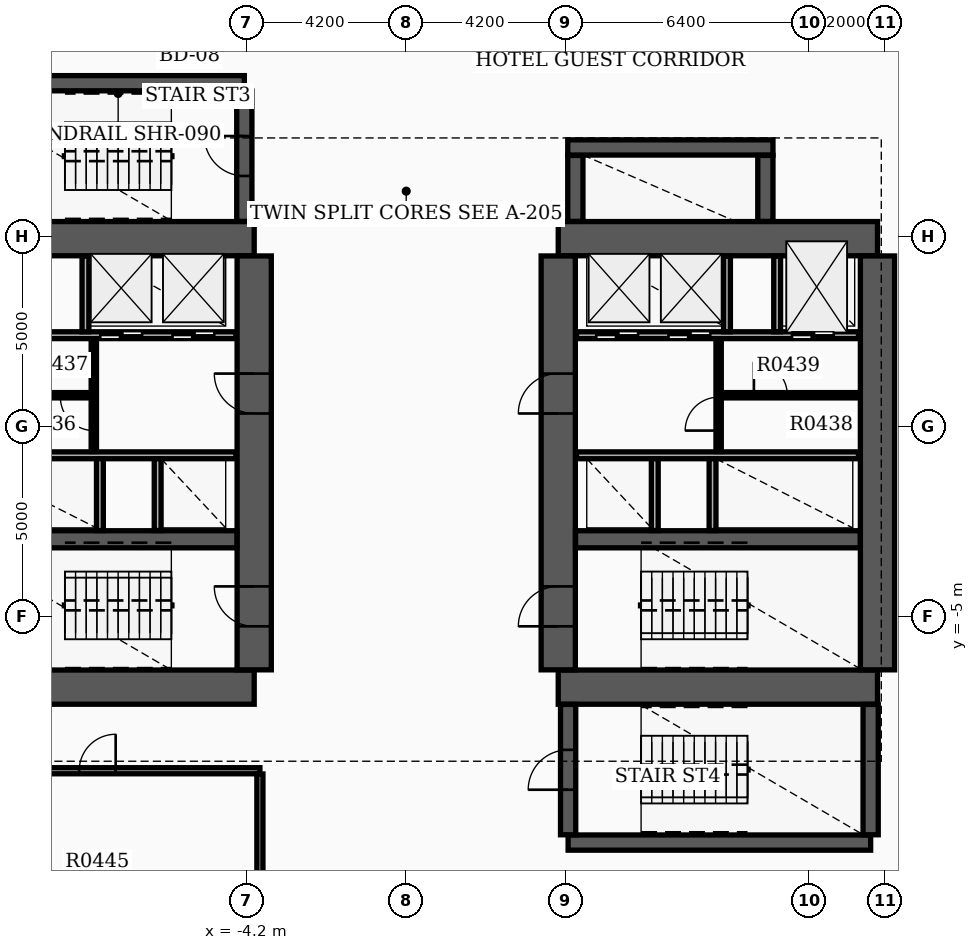
"""IFC4 building model, lengths in metres.
Left out: names, types, materials, properties, quantities, classifications, styles, units other than length and angle.
Written with IfcOpenShell. Run it as: python <this file> out.ifc"""

import sys

from ifc_helpers import new_model, si_unit, direction, frame, frame_2d, origin, place, context, subcontext, project, spatial, rectangle, extrude, element, fill, save


model = new_model("IFC4")
c1 = context("Model", 3, precision=1e-05, world=origin(), true_north=direction((0.0, 1.0)))
c2 = subcontext(c1, "Body", "Model", "MODEL_VIEW")
j1 = project(units=[si_unit("LENGTHUNIT", "METRE"), si_unit("PLANEANGLEUNIT", "RADIAN")], contexts=[c1])
p1 = place(None, origin())
s1 = spatial("IfcSite", under=j1, at=p1, CompositionType="ELEMENT")
p2 = place(p1, origin())
s2 = spatial("IfcBuilding", under=s1, at=p2, CompositionType="ELEMENT")
p3 = place(p2, frame((0.0, 0.0, 31.5)))
s3 = spatial("IfcBuildingStorey", under=s2, at=p3, CompositionType="ELEMENT", Elevation=31.5)
for number, where, z_axis, x_axis in (
    (1, (-12.4, -6.85, 0.0), (0.0, 0.0, 1.0), (1.0, 0.0, 0.0)),
    (2, (-12.4, 4.95, 0.0), (0.0, 0.0, 1.0), (1.0, 0.0, 0.0)),
):
    element("IfcWall", number, at=place(p3, frame(where, z_axis=z_axis, x_axis=x_axis)), inside=s3, PredefinedType="SHEAR", context=c2, shape_type="SweptSolid", body=[
        extrude(rectangle(XDim=8.4, YDim=0.9, at=frame_2d((4.2, 0.0))), origin(), (0.0, 0.0, 1.0), 3.7),
    ])
p4 = place(p3, frame((-4.0, -6.395, 0.0), z_axis=(0.0, 0.0, 1.0), x_axis=(0.0, 1.0, 0.0)))
e3 = element("IfcWall", 3, at=p4, inside=s3, PredefinedType="SHEAR", context=c2, shape_type="SweptSolid", body=[
    extrude(rectangle(XDim=10.89, YDim=0.9, at=frame_2d((5.445, 0.0))), origin(), (0.0, 0.0, 1.0), 3.7),
])
p5 = place(p4, frame((1.145, 0.0, 0.0)))
e4 = element("IfcOpeningElement", 4, at=p5, cuts=e3, PredefinedType="OPENING", context=c2, shape_type="SweptSolid", body=[
    extrude(rectangle(XDim=1.05, YDim=2.15, at=frame_2d((0.525, 1.075))), frame((0.0, 0.46, 0.0), z_axis=(0.0, -1.0, 0.0), x_axis=(1.0, 0.0, 0.0)), (0.0, 0.0, 1.0), 0.92),
])
p6 = place(p4, frame((6.745, 0.0, 0.0)))
e5 = element("IfcOpeningElement", 5, at=p6, cuts=e3, PredefinedType="OPENING", context=c2, shape_type="SweptSolid", body=[
    extrude(rectangle(XDim=1.05, YDim=2.15, at=frame_2d((0.525, 1.075))), frame((0.0, 0.46, 0.0), z_axis=(0.0, -1.0, 0.0), x_axis=(1.0, 0.0, 0.0)), (0.0, 0.0, 1.0), 0.92),
])
p7 = place(p3, frame((-11.945, -2.96, 0.0), z_axis=(0.0, 0.0, 1.0), x_axis=(1.0, 0.0, 0.0)))
e6 = element("IfcWall", 6, at=p7, inside=s3, PredefinedType="SHEAR", context=c2, shape_type="SweptSolid", body=[
    extrude(rectangle(XDim=7.49, YDim=0.45, at=frame_2d((3.745, 0.0))), origin(), (0.0, 0.0, 1.0), 3.7),
])
for number, where, z_axis, x_axis in (
    (7, (4.0, -6.85, 0.0), (0.0, 0.0, 1.0), (1.0, 0.0, 0.0)),
    (8, (4.0, 4.95, 0.0), (0.0, 0.0, 1.0), (1.0, 0.0, 0.0)),
):
    element("IfcWall", number, at=place(p3, frame(where, z_axis=z_axis, x_axis=x_axis)), inside=s3, PredefinedType="SHEAR", context=c2, shape_type="SweptSolid", body=[
        extrude(rectangle(XDim=8.4, YDim=0.9, at=frame_2d((4.2, 0.0))), origin(), (0.0, 0.0, 1.0), 3.7),
    ])
p8 = place(p3, frame((4.0, -6.395, 0.0), z_axis=(0.0, 0.0, 1.0), x_axis=(0.0, 1.0, 0.0)))
e9 = element("IfcWall", 9, at=p8, inside=s3, PredefinedType="SHEAR", context=c2, shape_type="SweptSolid", body=[
    extrude(rectangle(XDim=10.89, YDim=0.9, at=frame_2d((5.445, 0.0))), origin(), (0.0, 0.0, 1.0), 3.7),
])
p9 = place(p8, frame((1.145, 0.0, 0.0)))
e10 = element("IfcOpeningElement", 10, at=p9, cuts=e9, PredefinedType="OPENING", context=c2, shape_type="SweptSolid", body=[
    extrude(rectangle(XDim=1.05, YDim=2.15, at=frame_2d((0.525, 1.075))), frame((0.0, 0.46, 0.0), z_axis=(0.0, -1.0, 0.0), x_axis=(1.0, 0.0, 0.0)), (0.0, 0.0, 1.0), 0.92),
])
p10 = place(p8, frame((6.745, 0.0, 0.0)))
e11 = element("IfcOpeningElement", 11, at=p10, cuts=e9, PredefinedType="OPENING", context=c2, shape_type="SweptSolid", body=[
    extrude(rectangle(XDim=1.05, YDim=2.15, at=frame_2d((0.525, 1.075))), frame((0.0, 0.46, 0.0), z_axis=(0.0, -1.0, 0.0), x_axis=(1.0, 0.0, 0.0)), (0.0, 0.0, 1.0), 0.92),
])
p11 = place(p3, frame((12.4, -6.395, 0.0), z_axis=(0.0, 0.0, 1.0), x_axis=(0.0, 1.0, 0.0)))
e12 = element("IfcWall", 12, at=p11, inside=s3, PredefinedType="SHEAR", context=c2, shape_type="SweptSolid", body=[
    extrude(rectangle(XDim=10.89, YDim=0.9, at=frame_2d((5.445, 0.0))), origin(), (0.0, 0.0, 1.0), 3.7),
])
p12 = place(p3, frame((4.455, -2.96, 0.0), z_axis=(0.0, 0.0, 1.0), x_axis=(1.0, 0.0, 0.0)))
e13 = element("IfcWall", 13, at=p12, inside=s3, PredefinedType="SHEAR", context=c2, shape_type="SweptSolid", body=[
    extrude(rectangle(XDim=7.49, YDim=0.45, at=frame_2d((3.745, 0.0))), origin(), (0.0, 0.0, 1.0), 3.7),
])
p13 = place(p3, frame((-12.22, 9.04, 0.0), z_axis=(0.0, 0.0, 1.0), x_axis=(1.0, 0.0, 0.0)))
e14 = element("IfcWall", 14, at=p13, inside=s3, PredefinedType="SHEAR", context=c2, shape_type="SweptSolid", body=[
    extrude(rectangle(XDim=7.96, YDim=0.4, at=frame_2d((3.98, 0.0))), origin(), (0.0, 0.0, 1.0), 3.7),
])
p14 = place(p3, frame((-4.26, 5.405, 0.0), z_axis=(0.0, 0.0, 1.0), x_axis=(0.0, 1.0, 0.0)))
e15 = element("IfcWall", 15, at=p14, inside=s3, PredefinedType="SHEAR", context=c2, shape_type="SweptSolid", body=[
    extrude(rectangle(XDim=3.43, YDim=0.4, at=frame_2d((1.715, 0.0))), origin(), (0.0, 0.0, 1.0), 3.7),
])
p15 = place(p14, frame((1.195, 0.0, 0.0)))
e16 = element("IfcOpeningElement", 16, at=p15, cuts=e15, PredefinedType="OPENING", context=c2, shape_type="SweptSolid", body=[
    extrude(rectangle(XDim=1.05, YDim=2.15, at=frame_2d((0.525, 1.075))), frame((0.0, 0.21, 0.0), z_axis=(0.0, -1.0, 0.0), x_axis=(1.0, 0.0, 0.0)), (0.0, 0.0, 1.0), 0.42),
])
p16 = place(p3, frame((4.26, -10.94, 0.0), z_axis=(0.0, 0.0, 1.0), x_axis=(1.0, 0.0, 0.0)))
e17 = element("IfcWall", 17, at=p16, inside=s3, PredefinedType="SHEAR", context=c2, shape_type="SweptSolid", body=[
    extrude(rectangle(XDim=7.96, YDim=0.4, at=frame_2d((3.98, 0.0))), origin(), (0.0, 0.0, 1.0), 3.7),
])
p17 = place(p3, frame((4.26, -10.735, 0.0), z_axis=(0.0, 0.0, 1.0), x_axis=(0.0, 1.0, 0.0)))
e18 = element("IfcWall", 18, at=p17, inside=s3, PredefinedType="SHEAR", context=c2, shape_type="SweptSolid", body=[
    extrude(rectangle(XDim=3.43, YDim=0.4, at=frame_2d((1.715, 0.0))), origin(), (0.0, 0.0, 1.0), 3.7),
])
p18 = place(p17, frame((1.185, 0.0, 0.0)))
e19 = element("IfcOpeningElement", 19, at=p18, cuts=e18, PredefinedType="OPENING", context=c2, shape_type="SweptSolid", body=[
    extrude(rectangle(XDim=1.05, YDim=2.15, at=frame_2d((0.525, 1.075))), frame((0.0, 0.21, 0.0), z_axis=(0.0, -1.0, 0.0), x_axis=(1.0, 0.0, 0.0)), (0.0, 0.0, 1.0), 0.42),
])
p19 = place(p3, frame((12.22, -10.735, 0.0), z_axis=(0.0, 0.0, 1.0), x_axis=(0.0, 1.0, 0.0)))
e20 = element("IfcWall", 20, at=p19, inside=s3, PredefinedType="SHEAR", context=c2, shape_type="SweptSolid", body=[
    extrude(rectangle(XDim=3.43, YDim=0.4, at=frame_2d((1.715, 0.0))), origin(), (0.0, 0.0, 1.0), 3.7),
])
p20 = place(p3, frame((4.45, 5.405, 0.0), z_axis=(0.0, 0.0, 1.0), x_axis=(0.0, 1.0, 0.0)))
e21 = element("IfcWall", 21, at=p20, inside=s3, PredefinedType="SHEAR", context=c2, shape_type="SweptSolid", body=[
    extrude(rectangle(XDim=1.735, YDim=0.4, at=frame_2d((0.867, 0.0))), origin(), (0.0, 0.0, 1.0), 3.7),
])
p21 = place(p3, frame((4.25, 7.35, 0.0), z_axis=(0.0, 0.0, 1.0), x_axis=(1.0, 0.0, 0.0)))
e22 = element("IfcWall", 22, at=p21, inside=s3, PredefinedType="SHEAR", context=c2, shape_type="SweptSolid", body=[
    extrude(rectangle(XDim=5.4, YDim=0.4, at=frame_2d((2.7, 0.0))), origin(), (0.0, 0.0, 1.0), 3.7),
])
p22 = place(p3, frame((9.45, 5.405, 0.0), z_axis=(0.0, 0.0, 1.0), x_axis=(0.0, 1.0, 0.0)))
e23 = element("IfcWall", 23, at=p22, inside=s3, PredefinedType="SHEAR", context=c2, shape_type="SweptSolid", body=[
    extrude(rectangle(XDim=1.735, YDim=0.4, at=frame_2d((0.867, 0.0))), origin(), (0.0, 0.0, 1.0), 3.7),
])
p23 = place(p3, frame((-11.9, 2.41, 0.0), z_axis=(0.0, 0.0, 1.0), x_axis=(1.0, 0.0, 0.0)))
e24 = element("IfcWall", 24, at=p23, inside=s3, PredefinedType="SOLIDWALL", context=c2, shape_type="SweptSolid", body=[
    extrude(rectangle(XDim=7.42, YDim=0.18, at=frame_2d((3.71, 0.0))), origin(), (0.0, 0.0, 1.0), 2.9),
])
p24 = place(p23, frame((0.55, 0.0, 0.0)))
e25 = element("IfcOpeningElement", 25, at=p24, cuts=e24, PredefinedType="OPENING", context=c2, shape_type="SweptSolid", body=[
    extrude(rectangle(XDim=1.1, YDim=2.15, at=frame_2d((0.55, 1.075))), frame((0.0, 0.1, 0.0), z_axis=(0.0, -1.0, 0.0), x_axis=(1.0, 0.0, 0.0)), (0.0, 0.0, 1.0), 0.2),
])
p25 = place(p23, frame((3.85, 0.0, 0.0)))
e26 = element("IfcOpeningElement", 26, at=p25, cuts=e24, PredefinedType="OPENING", context=c2, shape_type="SweptSolid", body=[
    extrude(rectangle(XDim=1.1, YDim=2.15, at=frame_2d((0.55, 1.075))), frame((0.0, 0.1, 0.0), z_axis=(0.0, -1.0, 0.0), x_axis=(1.0, 0.0, 0.0)), (0.0, 0.0, 1.0), 0.2),
])
p26 = place(p23, frame((5.75, 0.0, 0.0)))
e27 = element("IfcOpeningElement", 27, at=p26, cuts=e24, PredefinedType="OPENING", context=c2, shape_type="SweptSolid", body=[
    extrude(rectangle(XDim=1.1, YDim=2.15, at=frame_2d((0.55, 1.075))), frame((0.0, 0.1, 0.0), z_axis=(0.0, -1.0, 0.0), x_axis=(1.0, 0.0, 0.0)), (0.0, 0.0, 1.0), 0.2),
])
p27 = place(p3, frame((4.48, 2.41, 0.0), z_axis=(0.0, 0.0, 1.0), x_axis=(1.0, 0.0, 0.0)))
e28 = element("IfcWall", 28, at=p27, inside=s3, PredefinedType="SOLIDWALL", context=c2, shape_type="SweptSolid", body=[
    extrude(rectangle(XDim=7.42, YDim=0.18, at=frame_2d((3.71, 0.0))), origin(), (0.0, 0.0, 1.0), 2.9),
])
p28 = place(p27, frame((5.67, 0.0, 0.0)))
e29 = element("IfcOpeningElement", 29, at=p28, cuts=e28, PredefinedType="OPENING", context=c2, shape_type="SweptSolid", body=[
    extrude(rectangle(XDim=1.1, YDim=2.15, at=frame_2d((0.55, 1.075))), frame((0.0, 0.1, 0.0), z_axis=(0.0, -1.0, 0.0), x_axis=(1.0, 0.0, 0.0)), (0.0, 0.0, 1.0), 0.2),
])
p29 = place(p27, frame((0.52, 0.0, 0.0)))
e30 = element("IfcOpeningElement", 30, at=p29, cuts=e28, PredefinedType="OPENING", context=c2, shape_type="SweptSolid", body=[
    extrude(rectangle(XDim=1.1, YDim=2.15, at=frame_2d((0.55, 1.075))), frame((0.0, 0.1, 0.0), z_axis=(0.0, -1.0, 0.0), x_axis=(1.0, 0.0, 0.0)), (0.0, 0.0, 1.0), 0.2),
])
p30 = place(p27, frame((2.42, 0.0, 0.0)))
e31 = element("IfcOpeningElement", 31, at=p30, cuts=e28, PredefinedType="OPENING", context=c2, shape_type="SweptSolid", body=[
    extrude(rectangle(XDim=1.1, YDim=2.15, at=frame_2d((0.55, 1.075))), frame((0.0, 0.1, 0.0), z_axis=(0.0, -1.0, 0.0), x_axis=(1.0, 0.0, 0.0)), (0.0, 0.0, 1.0), 0.2),
])
for number, where, z_axis, x_axis in (
    (32, (-11.9, -0.75, 0.0), (0.0, 0.0, 1.0), (1.0, 0.0, 0.0)),
    (33, (4.48, -0.75, 0.0), (0.0, 0.0, 1.0), (1.0, 0.0, 0.0)),
):
    element("IfcWall", number, at=place(p3, frame(where, z_axis=z_axis, x_axis=x_axis)), inside=s3, PredefinedType="SOLIDWALL", context=c2, shape_type="SweptSolid", body=[
        extrude(rectangle(XDim=7.42, YDim=0.18, at=frame_2d((3.71, 0.0))), origin(), (0.0, 0.0, 1.0), 2.9),
    ])
for number, where, z_axis, x_axis in (
    (34, (-8.44, 2.5, 0.0), (0.0, 0.0, 1.0), (0.0, 1.0, 0.0)),
    (35, (8.44, 2.5, 0.0), (0.0, 0.0, 1.0), (0.0, 1.0, 0.0)),
    (36, (9.76, 2.5, 0.0), (0.0, 0.0, 1.0), (0.0, 1.0, 0.0)),
):
    element("IfcWall", number, at=place(p3, frame(where, z_axis=z_axis, x_axis=x_axis)), inside=s3, PredefinedType="SOLIDWALL", context=c2, shape_type="SweptSolid", body=[
        extrude(rectangle(XDim=1.99, YDim=0.18, at=frame_2d((0.995, 0.0))), origin(), (0.0, 0.0, 1.0), 2.9),
    ])
for number, where, z_axis, x_axis in (
    (37, (-8.06, -2.73, 0.0), (0.0, 0.0, 1.0), (0.0, 1.0, 0.0)),
    (38, (-6.54, -2.73, 0.0), (0.0, 0.0, 1.0), (0.0, 1.0, 0.0)),
    (39, (6.54, -2.73, 0.0), (0.0, 0.0, 1.0), (0.0, 1.0, 0.0)),
    (40, (8.06, -2.73, 0.0), (0.0, 0.0, 1.0), (0.0, 1.0, 0.0)),
):
    element("IfcWall", number, at=place(p3, frame(where, z_axis=z_axis, x_axis=x_axis)), inside=s3, PredefinedType="SOLIDWALL", context=c2, shape_type="SweptSolid", body=[
        extrude(rectangle(XDim=1.89, YDim=0.18, at=frame_2d((0.945, 0.0))), origin(), (0.0, 0.0, 1.0), 2.9),
    ])
p31 = place(p3, frame((-8.22, -0.65, 0.0), z_axis=(0.0, 0.0, 1.0), x_axis=(0.0, 1.0, 0.0)))
e41 = element("IfcWall", 41, at=p31, inside=s3, PredefinedType="SOLIDWALL", context=c2, shape_type="SweptSolid", body=[
    extrude(rectangle(XDim=2.96, YDim=0.14, at=frame_2d((1.48, 0.0))), origin(), (0.0, 0.0, 1.0), 2.9),
])
p32 = place(p31, frame((0.55, 0.0, 0.0)))
e42 = element("IfcOpeningElement", 42, at=p32, cuts=e41, PredefinedType="OPENING", context=c2, shape_type="SweptSolid", body=[
    extrude(rectangle(XDim=0.88, YDim=2.1, at=frame_2d((0.44, 1.05))), frame((0.0, 0.08, 0.0), z_axis=(0.0, -1.0, 0.0), x_axis=(1.0, 0.0, 0.0)), (0.0, 0.0, 1.0), 0.16),
])
p33 = place(p3, frame((8.22, -0.65, 0.0), z_axis=(0.0, 0.0, 1.0), x_axis=(0.0, 1.0, 0.0)))
e43 = element("IfcWall", 43, at=p33, inside=s3, PredefinedType="SOLIDWALL", context=c2, shape_type="SweptSolid", body=[
    extrude(rectangle(XDim=2.96, YDim=0.14, at=frame_2d((1.48, 0.0))), origin(), (0.0, 0.0, 1.0), 2.9),
])
p34 = place(p33, frame((0.55, 0.0, 0.0)))
e44 = element("IfcOpeningElement", 44, at=p34, cuts=e43, PredefinedType="OPENING", context=c2, shape_type="SweptSolid", body=[
    extrude(rectangle(XDim=0.88, YDim=2.1, at=frame_2d((0.44, 1.05))), frame((0.0, 0.08, 0.0), z_axis=(0.0, -1.0, 0.0), x_axis=(1.0, 0.0, 0.0)), (0.0, 0.0, 1.0), 0.16),
])
p35 = place(p3, frame((-11.85, 0.83, 0.0), z_axis=(0.0, 0.0, 1.0), x_axis=(1.0, 0.0, 0.0)))
e45 = element("IfcWall", 45, at=p35, inside=s3, PredefinedType="PARTITIONING", context=c2, shape_type="SweptSolid", body=[
    extrude(rectangle(XDim=3.552, YDim=0.14, at=frame_2d((1.776, 0.0))), origin(), (0.0, 0.0, 1.0), 2.9),
])
p36 = place(p35, frame((0.85, 0.0, 0.0)))
e46 = element("IfcOpeningElement", 46, at=p36, cuts=e45, PredefinedType="OPENING", context=c2, shape_type="SweptSolid", body=[
    extrude(rectangle(XDim=0.88, YDim=2.1, at=frame_2d((0.44, 1.05))), frame((0.0, 0.08, 0.0), z_axis=(0.0, -1.0, 0.0), x_axis=(1.0, 0.0, 0.0)), (0.0, 0.0, 1.0), 0.16),
])
p37 = place(p3, frame((8.298, 0.83, 0.0), z_axis=(0.0, 0.0, 1.0), x_axis=(1.0, 0.0, 0.0)))
e47 = element("IfcWall", 47, at=p37, inside=s3, PredefinedType="PARTITIONING", context=c2, shape_type="SweptSolid", body=[
    extrude(rectangle(XDim=3.552, YDim=0.14, at=frame_2d((1.776, 0.0))), origin(), (0.0, 0.0, 1.0), 2.9),
])
p38 = place(p37, frame((0.85, 0.0, 0.0)))
e48 = element("IfcOpeningElement", 48, at=p38, cuts=e47, PredefinedType="OPENING", context=c2, shape_type="SweptSolid", body=[
    extrude(rectangle(XDim=0.88, YDim=2.1, at=frame_2d((0.44, 1.05))), frame((0.0, 0.08, 0.0), z_axis=(0.0, -1.0, 0.0), x_axis=(1.0, 0.0, 0.0)), (0.0, 0.0, 1.0), 0.16),
])
p39 = place(p3, frame((-12.4, -9.05, 0.0), z_axis=(0.0, 0.0, 1.0), x_axis=(1.0, 0.0, 0.0)))
e49 = element("IfcWall", 49, at=p39, inside=s3, PredefinedType="PARTITIONING", context=c2, shape_type="SweptSolid", body=[
    extrude(rectangle(XDim=8.55, YDim=0.16, at=frame_2d((4.275, 0.0))), origin(), (0.0, 0.0, 1.0), 2.9),
])
p40 = place(p39, frame((3.795, 0.0, 0.0)))
e50 = element("IfcOpeningElement", 50, at=p40, cuts=e49, PredefinedType="OPENING", context=c2, shape_type="SweptSolid", body=[
    extrude(rectangle(XDim=0.96, YDim=2.15, at=frame_2d((0.48, 1.075))), frame((0.0, 0.09, 0.0), z_axis=(0.0, -1.0, 0.0), x_axis=(1.0, 0.0, 0.0)), (0.0, 0.0, 1.0), 0.18),
])
p41 = place(p3, frame((-3.85, -13.065, 0.0), z_axis=(0.0, 0.0, 1.0), x_axis=(0.0, 1.0, 0.0)))
e51 = element("IfcWall", 51, at=p41, inside=s3, PredefinedType="PARTITIONING", context=c2, shape_type="SweptSolid", body=[
    extrude(rectangle(XDim=3.93, YDim=0.16, at=frame_2d((1.965, 0.0))), origin(), (0.0, 0.0, 1.0), 2.9),
])
p42 = place(p5, origin())
e52 = element("IfcDoor", 52, at=p42, inside=s3, OperationType="SINGLE_SWING_RIGHT", PredefinedType="DOOR", context=c2, shape_type="SweptSolid", body=[
    extrude(rectangle(XDim=1.05, YDim=2.15, at=frame_2d((0.525, 1.075))), frame((0.0, 0.025, 0.0), z_axis=(0.0, -1.0, 0.0), x_axis=(1.0, 0.0, 0.0)), (0.0, 0.0, 1.0), 0.05),
])
fill(e4, e52)
p43 = place(p9, origin())
e53 = element("IfcDoor", 53, at=p43, inside=s3, OperationType="SINGLE_SWING_LEFT", PredefinedType="DOOR", context=c2, shape_type="SweptSolid", body=[
    extrude(rectangle(XDim=1.05, YDim=2.15, at=frame_2d((0.525, 1.075))), frame((0.0, 0.025, 0.0), z_axis=(0.0, -1.0, 0.0), x_axis=(1.0, 0.0, 0.0)), (0.0, 0.0, 1.0), 0.05),
])
fill(e10, e53)
p44 = place(p6, origin())
e54 = element("IfcDoor", 54, at=p44, inside=s3, OperationType="SINGLE_SWING_RIGHT", PredefinedType="DOOR", context=c2, shape_type="SweptSolid", body=[
    extrude(rectangle(XDim=1.05, YDim=2.15, at=frame_2d((0.525, 1.075))), frame((0.0, 0.025, 0.0), z_axis=(0.0, -1.0, 0.0), x_axis=(1.0, 0.0, 0.0)), (0.0, 0.0, 1.0), 0.05),
])
fill(e5, e54)
p45 = place(p10, origin())
e55 = element("IfcDoor", 55, at=p45, inside=s3, OperationType="SINGLE_SWING_LEFT", PredefinedType="DOOR", context=c2, shape_type="SweptSolid", body=[
    extrude(rectangle(XDim=1.05, YDim=2.15, at=frame_2d((0.525, 1.075))), frame((0.0, 0.025, 0.0), z_axis=(0.0, -1.0, 0.0), x_axis=(1.0, 0.0, 0.0)), (0.0, 0.0, 1.0), 0.05),
])
fill(e11, e55)
p46 = place(p15, origin())
e56 = element("IfcDoor", 56, at=p46, inside=s3, OperationType="SINGLE_SWING_RIGHT", PredefinedType="DOOR", context=c2, shape_type="SweptSolid", body=[
    extrude(rectangle(XDim=1.05, YDim=2.15, at=frame_2d((0.525, 1.075))), frame((0.0, 0.025, 0.0), z_axis=(0.0, -1.0, 0.0), x_axis=(1.0, 0.0, 0.0)), (0.0, 0.0, 1.0), 0.05),
])
fill(e16, e56)
p47 = place(p18, origin())
e57 = element("IfcDoor", 57, at=p47, inside=s3, OperationType="SINGLE_SWING_LEFT", PredefinedType="DOOR", context=c2, shape_type="SweptSolid", body=[
    extrude(rectangle(XDim=1.05, YDim=2.15, at=frame_2d((0.525, 1.075))), frame((0.0, 0.025, 0.0), z_axis=(0.0, -1.0, 0.0), x_axis=(1.0, 0.0, 0.0)), (0.0, 0.0, 1.0), 0.05),
])
fill(e19, e57)
p48 = place(p28, origin())
e58 = element("IfcDoor", 58, at=p48, inside=s3, OperationType="DOUBLE_DOOR_SLIDING", PredefinedType="DOOR", context=c2, shape_type="SweptSolid", body=[
    extrude(rectangle(XDim=1.1, YDim=2.15, at=frame_2d((0.55, 1.075))), frame((0.0, 0.025, 0.0), z_axis=(0.0, -1.0, 0.0), x_axis=(1.0, 0.0, 0.0)), (0.0, 0.0, 1.0), 0.05),
])
fill(e29, e58)
p49 = place(p25, origin())
e59 = element("IfcDoor", 59, at=p49, inside=s3, OperationType="DOUBLE_DOOR_SLIDING", PredefinedType="DOOR", context=c2, shape_type="SweptSolid", body=[
    extrude(rectangle(XDim=1.1, YDim=2.15, at=frame_2d((0.55, 1.075))), frame((0.0, 0.025, 0.0), z_axis=(0.0, -1.0, 0.0), x_axis=(1.0, 0.0, 0.0)), (0.0, 0.0, 1.0), 0.05),
])
fill(e26, e59)
p50 = place(p26, origin())
e60 = element("IfcDoor", 60, at=p50, inside=s3, OperationType="DOUBLE_DOOR_SLIDING", PredefinedType="DOOR", context=c2, shape_type="SweptSolid", body=[
    extrude(rectangle(XDim=1.1, YDim=2.15, at=frame_2d((0.55, 1.075))), frame((0.0, 0.025, 0.0), z_axis=(0.0, -1.0, 0.0), x_axis=(1.0, 0.0, 0.0)), (0.0, 0.0, 1.0), 0.05),
])
fill(e27, e60)
p51 = place(p29, origin())
e61 = element("IfcDoor", 61, at=p51, inside=s3, OperationType="DOUBLE_DOOR_SLIDING", PredefinedType="DOOR", context=c2, shape_type="SweptSolid", body=[
    extrude(rectangle(XDim=1.1, YDim=2.15, at=frame_2d((0.55, 1.075))), frame((0.0, 0.025, 0.0), z_axis=(0.0, -1.0, 0.0), x_axis=(1.0, 0.0, 0.0)), (0.0, 0.0, 1.0), 0.05),
])
fill(e30, e61)
p52 = place(p30, origin())
e62 = element("IfcDoor", 62, at=p52, inside=s3, OperationType="DOUBLE_DOOR_SLIDING", PredefinedType="DOOR", context=c2, shape_type="SweptSolid", body=[
    extrude(rectangle(XDim=1.1, YDim=2.15, at=frame_2d((0.55, 1.075))), frame((0.0, 0.025, 0.0), z_axis=(0.0, -1.0, 0.0), x_axis=(1.0, 0.0, 0.0)), (0.0, 0.0, 1.0), 0.05),
])
fill(e31, e62)
p53 = place(p32, origin())
e63 = element("IfcDoor", 63, at=p53, inside=s3, OperationType="SINGLE_SWING_RIGHT", PredefinedType="DOOR", context=c2, shape_type="SweptSolid", body=[
    extrude(rectangle(XDim=0.88, YDim=2.1, at=frame_2d((0.44, 1.05))), frame((0.0, 0.025, 0.0), z_axis=(0.0, -1.0, 0.0), x_axis=(1.0, 0.0, 0.0)), (0.0, 0.0, 1.0), 0.05),
])
fill(e42, e63)
p54 = place(p34, origin())
e64 = element("IfcDoor", 64, at=p54, inside=s3, OperationType="SINGLE_SWING_LEFT", PredefinedType="DOOR", context=c2, shape_type="SweptSolid", body=[
    extrude(rectangle(XDim=0.88, YDim=2.1, at=frame_2d((0.44, 1.05))), frame((0.0, 0.025, 0.0), z_axis=(0.0, -1.0, 0.0), x_axis=(1.0, 0.0, 0.0)), (0.0, 0.0, 1.0), 0.05),
])
fill(e44, e64)
p55 = place(p38, origin())
e65 = element("IfcDoor", 65, at=p55, inside=s3, OperationType="SINGLE_SWING_LEFT", PredefinedType="DOOR", context=c2, shape_type="SweptSolid", body=[
    extrude(rectangle(XDim=0.88, YDim=2.1, at=frame_2d((0.44, 1.05))), frame((0.0, 0.025, 0.0), z_axis=(0.0, -1.0, 0.0), x_axis=(1.0, 0.0, 0.0)), (0.0, 0.0, 1.0), 0.05),
])
fill(e48, e65)
p56 = place(p40, origin())
e66 = element("IfcDoor", 66, at=p56, inside=s3, OperationType="SINGLE_SWING_RIGHT", PredefinedType="DOOR", context=c2, shape_type="SweptSolid", body=[
    extrude(rectangle(XDim=0.96, YDim=2.15, at=frame_2d((0.48, 1.075))), frame((0.0, 0.025, 0.0), z_axis=(0.0, -1.0, 0.0), x_axis=(1.0, 0.0, 0.0)), (0.0, 0.0, 1.0), 0.05),
])
fill(e50, e66)
save(model, sys.argv[1])
